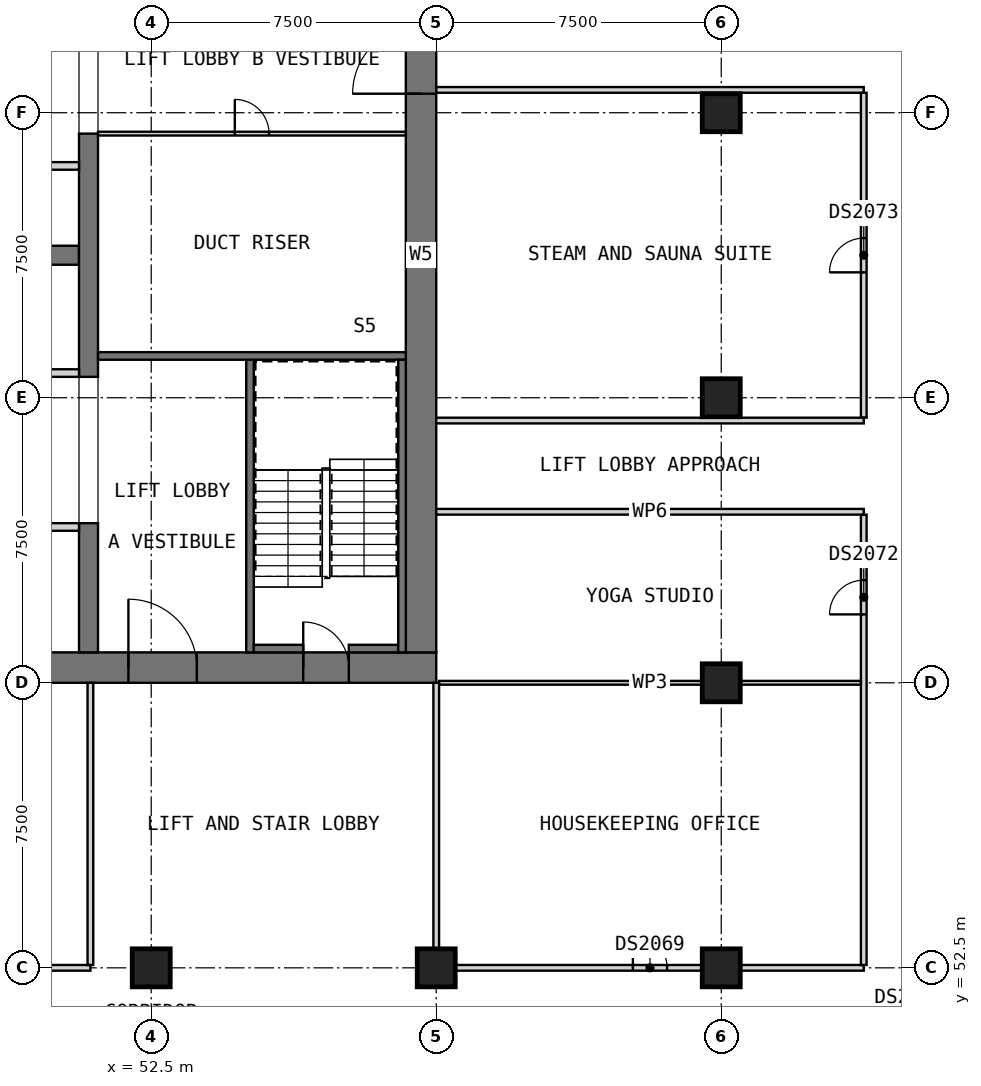
"""IFC4 building model, lengths in metres.
Left out: names, types, materials, properties, quantities, classifications, styles, units other than length and angle.
Written with IfcOpenShell. Run it as: python <this file> out.ifc"""

import sys

from ifc_helpers import new_model, si_unit, direction, frame, frame_2d, origin, origin_2d, place, context, subcontext, project, spatial, rectangle, extrude, element, fill, save


model = new_model("IFC4")
c1 = context("Model", 3, precision=1e-05, world=origin(), true_north=direction((0.0, 1.0)))
c2 = subcontext(c1, "Body", "Model", "MODEL_VIEW")
j1 = project(units=[si_unit("LENGTHUNIT", "METRE"), si_unit("PLANEANGLEUNIT", "RADIAN")], contexts=[c1])
p1 = place(None, origin())
s1 = spatial("IfcSite", under=j1, at=p1, CompositionType="ELEMENT")
p2 = place(p1, origin())
s2 = spatial("IfcBuilding", under=s1, at=p2, CompositionType="ELEMENT")
p3 = place(p2, frame((0.0, 0.0, 133.8)))
s3 = spatial("IfcBuildingStorey", under=s2, at=p3, CompositionType="ELEMENT", Elevation=133.8)
for number, where, z_axis, x_axis in (
    (1, (52.5, 52.5, 0.0), (0.0, 0.0, 1.0), (1.0, 0.0, 0.0)),
    (2, (60.0, 52.5, 0.0), (0.0, 0.0, 1.0), (1.0, 0.0, 0.0)),
    (3, (67.5, 52.5, 0.0), (0.0, 0.0, 1.0), (1.0, 0.0, 0.0)),
    (4, (67.5, 60.0, 0.0), (0.0, 0.0, 1.0), (1.0, 0.0, 0.0)),
    (5, (67.5, 67.5, 0.0), (0.0, 0.0, 1.0), (1.0, 0.0, 0.0)),
    (6, (67.5, 75.0, 0.0), (0.0, 0.0, 1.0), (1.0, 0.0, 0.0)),
):
    element("IfcColumn", number, at=place(p3, frame(where, z_axis=z_axis, x_axis=x_axis)), inside=s3, PredefinedType="COLUMN", context=c2, shape_type="SweptSolid", body=[
        extrude(rectangle(XDim=1.0, YDim=1.0, at=origin_2d()), origin(), (0.0, 0.0, 1.0), 3.6),
    ])
p4 = place(p3, frame((30.0, 60.4, 0.0), z_axis=(0.0, 0.0, 1.0), x_axis=(1.0, 0.0, 0.0)))
e7 = element("IfcWall", 7, at=p4, inside=s3, PredefinedType="SHEAR", context=c2, shape_type="SweptSolid", body=[
    extrude(rectangle(XDim=30.0, YDim=0.8, at=frame_2d((15.0, 0.0))), origin(), (0.0, 0.0, 1.0), 3.6),
])
p5 = place(p4, frame((21.9, 0.0, 0.0)))
e8 = element("IfcOpeningElement", 8, at=p5, cuts=e7, PredefinedType="OPENING", context=c2, shape_type="SweptSolid", body=[
    extrude(rectangle(XDim=1.8, YDim=2.1, at=frame_2d((0.9, 1.05))), frame((0.0, 0.41, 0.0), z_axis=(0.0, -1.0, 0.0), x_axis=(1.0, 0.0, 0.0)), (0.0, 0.0, 1.0), 0.82),
])
p6 = place(p4, frame((26.5, 0.0, 0.0)))
e9 = element("IfcOpeningElement", 9, at=p6, cuts=e7, PredefinedType="OPENING", context=c2, shape_type="SweptSolid", body=[
    extrude(rectangle(XDim=1.2, YDim=2.1, at=frame_2d((0.6, 1.05))), frame((0.0, 0.41, 0.0), z_axis=(0.0, -1.0, 0.0), x_axis=(1.0, 0.0, 0.0)), (0.0, 0.0, 1.0), 0.82),
])
p7 = place(p3, frame((59.6, 60.8, 0.0), z_axis=(0.0, 0.0, 1.0), x_axis=(0.0, 1.0, 0.0)))
e10 = element("IfcWall", 10, at=p7, inside=s3, PredefinedType="SHEAR", context=c2, shape_type="SweptSolid", body=[
    extrude(rectangle(XDim=20.9, YDim=0.8, at=frame_2d((10.45, 0.0))), origin(), (0.0, 0.0, 1.0), 3.6),
])
p8 = place(p7, frame((14.7, 0.0, 0.0)))
e11 = element("IfcOpeningElement", 11, at=p8, cuts=e10, PredefinedType="OPENING", context=c2, shape_type="SweptSolid", body=[
    extrude(rectangle(XDim=1.8, YDim=2.1, at=frame_2d((0.9, 1.05))), frame((0.0, 0.41, 0.0), z_axis=(0.0, -1.0, 0.0), x_axis=(1.0, 0.0, 0.0)), (0.0, 0.0, 1.0), 0.82),
])
p9 = place(p3, frame((35.0, 71.25, 0.0), z_axis=(0.0, 0.0, 1.0), x_axis=(1.0, 0.0, 0.0)))
e12 = element("IfcWall", 12, at=p9, inside=s3, PredefinedType="SHEAR", context=c2, shape_type="SweptSolid", body=[
    extrude(rectangle(XDim=15.6, YDim=0.5, at=frame_2d((7.8, 0.0))), origin(), (0.0, 0.0, 1.0), 3.6),
])
p10 = place(p3, frame((50.85, 60.8, 0.0), z_axis=(0.0, 0.0, 1.0), x_axis=(0.0, 1.0, 0.0)))
e13 = element("IfcWall", 13, at=p10, inside=s3, PredefinedType="SHEAR", context=c2, shape_type="SweptSolid", body=[
    extrude(rectangle(XDim=3.4, YDim=0.5, at=frame_2d((1.7, 0.0))), origin(), (0.0, 0.0, 1.0), 3.6),
])
p11 = place(p3, frame((50.85, 68.05, 0.0), z_axis=(0.0, 0.0, 1.0), x_axis=(0.0, 1.0, 0.0)))
e14 = element("IfcWall", 14, at=p11, inside=s3, PredefinedType="SHEAR", context=c2, shape_type="SweptSolid", body=[
    extrude(rectangle(XDim=6.4, YDim=0.5, at=frame_2d((3.2, 0.0))), origin(), (0.0, 0.0, 1.0), 3.6),
])
p12 = place(p3, frame((35.0, 64.1, 0.0), z_axis=(0.0, 0.0, 1.0), x_axis=(1.0, 0.0, 0.0)))
e15 = element("IfcWall", 15, at=p12, inside=s3, PredefinedType="PARTITIONING", context=c2, shape_type="SweptSolid", body=[
    extrude(rectangle(XDim=15.6, YDim=0.2, at=frame_2d((7.8, 0.0))), origin(), (0.0, 0.0, 1.0), 3.35),
])
p13 = place(p12, frame((3.525, 0.0, 0.0)))
e16 = element("IfcOpeningElement", 16, at=p13, cuts=e15, PredefinedType="OPENING", context=c2, shape_type="SweptSolid", body=[
    extrude(rectangle(XDim=0.9, YDim=2.1, at=frame_2d((0.45, 1.05))), frame((0.0, 0.11, 0.0), z_axis=(0.0, -1.0, 0.0), x_axis=(1.0, 0.0, 0.0)), (0.0, 0.0, 1.0), 0.22),
])
p14 = place(p12, frame((11.325, 0.0, 0.0)))
e17 = element("IfcOpeningElement", 17, at=p14, cuts=e15, PredefinedType="OPENING", context=c2, shape_type="SweptSolid", body=[
    extrude(rectangle(XDim=0.9, YDim=2.1, at=frame_2d((0.45, 1.05))), frame((0.0, 0.11, 0.0), z_axis=(0.0, -1.0, 0.0), x_axis=(1.0, 0.0, 0.0)), (0.0, 0.0, 1.0), 0.22),
])
p15 = place(p3, frame((35.0, 68.15, 0.0), z_axis=(0.0, 0.0, 1.0), x_axis=(1.0, 0.0, 0.0)))
e18 = element("IfcWall", 18, at=p15, inside=s3, PredefinedType="PARTITIONING", context=c2, shape_type="SweptSolid", body=[
    extrude(rectangle(XDim=15.6, YDim=0.2, at=frame_2d((7.8, 0.0))), origin(), (0.0, 0.0, 1.0), 3.35),
])
p16 = place(p15, frame((2.6, 0.0, 0.0)))
e19 = element("IfcOpeningElement", 19, at=p16, cuts=e18, PredefinedType="OPENING", context=c2, shape_type="SweptSolid", body=[
    extrude(rectangle(XDim=0.9, YDim=2.1, at=frame_2d((0.45, 1.05))), frame((0.0, 0.11, 0.0), z_axis=(0.0, -1.0, 0.0), x_axis=(1.0, 0.0, 0.0)), (0.0, 0.0, 1.0), 0.22),
])
p17 = place(p15, frame((10.4, 0.0, 0.0)))
e20 = element("IfcOpeningElement", 20, at=p17, cuts=e18, PredefinedType="OPENING", context=c2, shape_type="SweptSolid", body=[
    extrude(rectangle(XDim=0.9, YDim=2.1, at=frame_2d((0.45, 1.05))), frame((0.0, 0.11, 0.0), z_axis=(0.0, -1.0, 0.0), x_axis=(1.0, 0.0, 0.0)), (0.0, 0.0, 1.0), 0.22),
])
p18 = place(p3, frame((35.0, 73.6, 0.0), z_axis=(0.0, 0.0, 1.0), x_axis=(1.0, 0.0, 0.0)))
e21 = element("IfcWall", 21, at=p18, inside=s3, PredefinedType="SOLIDWALL", context=c2, shape_type="SweptSolid", body=[
    extrude(rectangle(XDim=15.6, YDim=0.2, at=frame_2d((7.8, 0.0))), origin(), (0.0, 0.0, 1.0), 3.6),
])
p19 = place(p18, frame((0.75, 0.0, 0.0)))
e22 = element("IfcOpeningElement", 22, at=p19, cuts=e21, PredefinedType="OPENING", context=c2, shape_type="SweptSolid", body=[
    extrude(rectangle(XDim=1.1, YDim=2.1, at=frame_2d((0.55, 1.05))), frame((0.0, 0.11, 0.0), z_axis=(0.0, -1.0, 0.0), x_axis=(1.0, 0.0, 0.0)), (0.0, 0.0, 1.0), 0.22),
])
p20 = place(p18, frame((3.35, 0.0, 0.0)))
e23 = element("IfcOpeningElement", 23, at=p20, cuts=e21, PredefinedType="OPENING", context=c2, shape_type="SweptSolid", body=[
    extrude(rectangle(XDim=1.1, YDim=2.1, at=frame_2d((0.55, 1.05))), frame((0.0, 0.11, 0.0), z_axis=(0.0, -1.0, 0.0), x_axis=(1.0, 0.0, 0.0)), (0.0, 0.0, 1.0), 0.22),
])
p21 = place(p18, frame((5.95, 0.0, 0.0)))
e24 = element("IfcOpeningElement", 24, at=p21, cuts=e21, PredefinedType="OPENING", context=c2, shape_type="SweptSolid", body=[
    extrude(rectangle(XDim=1.1, YDim=2.1, at=frame_2d((0.55, 1.05))), frame((0.0, 0.11, 0.0), z_axis=(0.0, -1.0, 0.0), x_axis=(1.0, 0.0, 0.0)), (0.0, 0.0, 1.0), 0.22),
])
p22 = place(p18, frame((8.55, 0.0, 0.0)))
e25 = element("IfcOpeningElement", 25, at=p22, cuts=e21, PredefinedType="OPENING", context=c2, shape_type="SweptSolid", body=[
    extrude(rectangle(XDim=1.1, YDim=2.1, at=frame_2d((0.55, 1.05))), frame((0.0, 0.11, 0.0), z_axis=(0.0, -1.0, 0.0), x_axis=(1.0, 0.0, 0.0)), (0.0, 0.0, 1.0), 0.22),
])
p23 = place(p18, frame((11.15, 0.0, 0.0)))
e26 = element("IfcOpeningElement", 26, at=p23, cuts=e21, PredefinedType="OPENING", context=c2, shape_type="SweptSolid", body=[
    extrude(rectangle(XDim=1.1, YDim=2.1, at=frame_2d((0.55, 1.05))), frame((0.0, 0.11, 0.0), z_axis=(0.0, -1.0, 0.0), x_axis=(1.0, 0.0, 0.0)), (0.0, 0.0, 1.0), 0.22),
])
p24 = place(p18, frame((13.75, 0.0, 0.0)))
e27 = element("IfcOpeningElement", 27, at=p24, cuts=e21, PredefinedType="OPENING", context=c2, shape_type="SweptSolid", body=[
    extrude(rectangle(XDim=1.1, YDim=2.1, at=frame_2d((0.55, 1.05))), frame((0.0, 0.11, 0.0), z_axis=(0.0, -1.0, 0.0), x_axis=(1.0, 0.0, 0.0)), (0.0, 0.0, 1.0), 0.22),
])
p25 = place(p3, frame((55.1, 60.8, 0.0), z_axis=(0.0, 0.0, 1.0), x_axis=(0.0, 1.0, 0.0)))
e28 = element("IfcWall", 28, at=p25, inside=s3, PredefinedType="SOLIDWALL", context=c2, shape_type="SweptSolid", body=[
    extrude(rectangle(XDim=7.8, YDim=0.2, at=frame_2d((3.9, 0.0))), origin(), (0.0, 0.0, 1.0), 3.35),
])
p26 = place(p3, frame((51.1, 68.6, 0.0), z_axis=(0.0, 0.0, 1.0), x_axis=(1.0, 0.0, 0.0)))
e29 = element("IfcWall", 29, at=p26, inside=s3, PredefinedType="SOLIDWALL", context=c2, shape_type="SweptSolid", body=[
    extrude(rectangle(XDim=8.1, YDim=0.2, at=frame_2d((4.05, 0.0))), origin(), (0.0, 0.0, 1.0), 3.35),
])
for number, where, z_axis, x_axis in (
    (30, (55.2, 60.9, 0.0), (0.0, 0.0, 1.0), (1.0, 0.0, 0.0)),
    (31, (57.7, 60.9, 0.0), (0.0, 0.0, 1.0), (1.0, 0.0, 0.0)),
):
    element("IfcWall", number, at=place(p3, frame(where, z_axis=z_axis, x_axis=x_axis)), inside=s3, PredefinedType="SOLIDWALL", context=c2, shape_type="SweptSolid", body=[
        extrude(rectangle(XDim=1.3, YDim=0.2, at=frame_2d((0.65, 0.0))), origin(), (0.0, 0.0, 1.0), 3.35),
    ])
p27 = place(p3, frame((59.1, 60.8, 0.0), z_axis=(0.0, 0.0, 1.0), x_axis=(0.0, 1.0, 0.0)))
e32 = element("IfcWall", 32, at=p27, inside=s3, PredefinedType="SOLIDWALL", context=c2, shape_type="SweptSolid", body=[
    extrude(rectangle(XDim=7.7, YDim=0.2, at=frame_2d((3.85, 0.0))), origin(), (0.0, 0.0, 1.0), 3.35),
])
p28 = place(p3, frame((51.1, 74.45, 0.0), z_axis=(0.0, 0.0, 1.0), x_axis=(1.0, 0.0, 0.0)))
e33 = element("IfcWall", 33, at=p28, inside=s3, PredefinedType="PARTITIONING", context=c2, shape_type="SweptSolid", body=[
    extrude(rectangle(XDim=8.1, YDim=0.1, at=frame_2d((4.05, 0.0))), origin(), (0.0, 0.0, 1.0), 3.35),
])
p29 = place(p28, frame((3.6, 0.0, 0.0)))
e34 = element("IfcOpeningElement", 34, at=p29, cuts=e33, PredefinedType="OPENING", context=c2, shape_type="SweptSolid", body=[
    extrude(rectangle(XDim=0.9, YDim=2.1, at=frame_2d((0.45, 1.05))), frame((0.0, 0.06, 0.0), z_axis=(0.0, -1.0, 0.0), x_axis=(1.0, 0.0, 0.0)), (0.0, 0.0, 1.0), 0.12),
])
p30 = place(p3, frame((33.75, 52.5, 0.0), z_axis=(0.0, 0.0, 1.0), x_axis=(1.0, 0.0, 0.0)))
e35 = element("IfcWall", 35, at=p30, inside=s3, PredefinedType="PARTITIONING", context=c2, shape_type="SweptSolid", body=[
    extrude(rectangle(XDim=17.15, YDim=0.15, at=frame_2d((8.575, 0.0))), origin(), (0.0, 0.0, 1.0), 3.35),
])
p31 = place(p30, frame((1.8, 0.0, 0.0)))
e36 = element("IfcOpeningElement", 36, at=p31, cuts=e35, PredefinedType="OPENING", context=c2, shape_type="SweptSolid", body=[
    extrude(rectangle(XDim=0.9, YDim=2.1, at=frame_2d((0.45, 1.05))), frame((0.0, 0.085, 0.0), z_axis=(0.0, -1.0, 0.0), x_axis=(1.0, 0.0, 0.0)), (0.0, 0.0, 1.0), 0.17),
])
p32 = place(p30, frame((5.775, 0.0, 0.0)))
e37 = element("IfcOpeningElement", 37, at=p32, cuts=e35, PredefinedType="OPENING", context=c2, shape_type="SweptSolid", body=[
    extrude(rectangle(XDim=0.9, YDim=2.1, at=frame_2d((0.45, 1.05))), frame((0.0, 0.085, 0.0), z_axis=(0.0, -1.0, 0.0), x_axis=(1.0, 0.0, 0.0)), (0.0, 0.0, 1.0), 0.17),
])
p33 = place(p30, frame((12.1, 0.0, 0.0)))
e38 = element("IfcOpeningElement", 38, at=p33, cuts=e35, PredefinedType="OPENING", context=c2, shape_type="SweptSolid", body=[
    extrude(rectangle(XDim=0.9, YDim=2.1, at=frame_2d((0.45, 1.05))), frame((0.0, 0.085, 0.0), z_axis=(0.0, -1.0, 0.0), x_axis=(1.0, 0.0, 0.0)), (0.0, 0.0, 1.0), 0.17),
])
p34 = place(p3, frame((60.0, 52.5, 0.0), z_axis=(0.0, 0.0, 1.0), x_axis=(1.0, 0.0, 0.0)))
e39 = element("IfcWall", 39, at=p34, inside=s3, PredefinedType="PARTITIONING", context=c2, shape_type="SweptSolid", body=[
    extrude(rectangle(XDim=11.25, YDim=0.15, at=frame_2d((5.625, 0.0))), origin(), (0.0, 0.0, 1.0), 3.35),
])
p35 = place(p34, frame((5.175, 0.0, 0.0)))
e40 = element("IfcOpeningElement", 40, at=p35, cuts=e39, PredefinedType="OPENING", context=c2, shape_type="SweptSolid", body=[
    extrude(rectangle(XDim=0.9, YDim=2.1, at=frame_2d((0.45, 1.05))), frame((0.0, 0.085, 0.0), z_axis=(0.0, -1.0, 0.0), x_axis=(1.0, 0.0, 0.0)), (0.0, 0.0, 1.0), 0.17),
])
p36 = place(p3, frame((71.25, 52.575, 0.0), z_axis=(0.0, 0.0, 1.0), x_axis=(0.0, 1.0, 0.0)))
e41 = element("IfcWall", 41, at=p36, inside=s3, PredefinedType="PARTITIONING", context=c2, shape_type="SweptSolid", body=[
    extrude(rectangle(XDim=11.85, YDim=0.15, at=frame_2d((5.925, 0.0))), origin(), (0.0, 0.0, 1.0), 3.35),
])
p37 = place(p36, frame((9.225, 0.0, 0.0)))
e42 = element("IfcOpeningElement", 42, at=p37, cuts=e41, PredefinedType="OPENING", context=c2, shape_type="SweptSolid", body=[
    extrude(rectangle(XDim=0.9, YDim=2.1, at=frame_2d((0.45, 1.05))), frame((0.0, 0.085, 0.0), z_axis=(0.0, -1.0, 0.0), x_axis=(1.0, 0.0, 0.0)), (0.0, 0.0, 1.0), 0.17),
])
p38 = place(p3, frame((71.25, 66.975, 0.0), z_axis=(0.0, 0.0, 1.0), x_axis=(0.0, 1.0, 0.0)))
e43 = element("IfcWall", 43, at=p38, inside=s3, PredefinedType="PARTITIONING", context=c2, shape_type="SweptSolid", body=[
    extrude(rectangle(XDim=8.55, YDim=0.15, at=frame_2d((4.275, 0.0))), origin(), (0.0, 0.0, 1.0), 3.35),
])
p39 = place(p38, frame((3.825, 0.0, 0.0)))
e44 = element("IfcOpeningElement", 44, at=p39, cuts=e43, PredefinedType="OPENING", context=c2, shape_type="SweptSolid", body=[
    extrude(rectangle(XDim=0.9, YDim=2.1, at=frame_2d((0.45, 1.05))), frame((0.0, 0.085, 0.0), z_axis=(0.0, -1.0, 0.0), x_axis=(1.0, 0.0, 0.0)), (0.0, 0.0, 1.0), 0.17),
])
p40 = place(p3, frame((60.075, 60.0, 0.0), z_axis=(0.0, 0.0, 1.0), x_axis=(1.0, 0.0, 0.0)))
e45 = element("IfcWall", 45, at=p40, inside=s3, PredefinedType="PARTITIONING", context=c2, shape_type="SweptSolid", body=[
    extrude(rectangle(XDim=11.1, YDim=0.1, at=frame_2d((5.55, 0.0))), origin(), (0.0, 0.0, 1.0), 3.35),
])
for number, where, z_axis, x_axis in (
    (46, (60.0, 64.5, 0.0), (0.0, 0.0, 1.0), (1.0, 0.0, 0.0)),
    (47, (60.0, 66.9, 0.0), (0.0, 0.0, 1.0), (1.0, 0.0, 0.0)),
    (48, (60.0, 75.6, 0.0), (0.0, 0.0, 1.0), (1.0, 0.0, 0.0)),
):
    element("IfcWall", number, at=place(p3, frame(where, z_axis=z_axis, x_axis=x_axis)), inside=s3, PredefinedType="PARTITIONING", context=c2, shape_type="SweptSolid", body=[
        extrude(rectangle(XDim=11.25, YDim=0.15, at=frame_2d((5.625, 0.0))), origin(), (0.0, 0.0, 1.0), 3.35),
    ])
for number, where, z_axis, x_axis in (
    (49, (50.9, 52.575, 0.0), (0.0, 0.0, 1.0), (0.0, 1.0, 0.0)),
    (50, (60.0, 52.575, 0.0), (0.0, 0.0, 1.0), (0.0, 1.0, 0.0)),
):
    element("IfcWall", number, at=place(p3, frame(where, z_axis=z_axis, x_axis=x_axis)), inside=s3, PredefinedType="PARTITIONING", context=c2, shape_type="SweptSolid", body=[
        extrude(rectangle(XDim=7.425, YDim=0.15, at=frame_2d((3.712, 0.0))), origin(), (0.0, 0.0, 1.0), 3.35),
    ])
p41 = place(p5, origin())
e51 = element("IfcDoor", 51, at=p41, inside=s3, OperationType="DOUBLE_DOOR_SINGLE_SWING", PredefinedType="DOOR", context=c2, shape_type="SweptSolid", body=[
    extrude(rectangle(XDim=1.8, YDim=2.1, at=frame_2d((0.9, 1.05))), frame((0.0, 0.025, 0.0), z_axis=(0.0, -1.0, 0.0), x_axis=(1.0, 0.0, 0.0)), (0.0, 0.0, 1.0), 0.05),
])
fill(e8, e51)
p42 = place(p8, origin())
e52 = element("IfcDoor", 52, at=p42, inside=s3, OperationType="DOUBLE_DOOR_SINGLE_SWING", PredefinedType="DOOR", context=c2, shape_type="SweptSolid", body=[
    extrude(rectangle(XDim=1.8, YDim=2.1, at=frame_2d((0.9, 1.05))), frame((0.0, 0.025, 0.0), z_axis=(0.0, -1.0, 0.0), x_axis=(1.0, 0.0, 0.0)), (0.0, 0.0, 1.0), 0.05),
])
fill(e11, e52)
p43 = place(p6, origin())
e53 = element("IfcDoor", 53, at=p43, inside=s3, OperationType="SINGLE_SWING_LEFT", PredefinedType="DOOR", context=c2, shape_type="SweptSolid", body=[
    extrude(rectangle(XDim=1.2, YDim=2.1, at=frame_2d((0.6, 1.05))), frame((0.0, 0.025, 0.0), z_axis=(0.0, -1.0, 0.0), x_axis=(1.0, 0.0, 0.0)), (0.0, 0.0, 1.0), 0.05),
])
fill(e9, e53)
p44 = place(p29, origin())
e54 = element("IfcDoor", 54, at=p44, inside=s3, OperationType="SINGLE_SWING_RIGHT", PredefinedType="DOOR", context=c2, shape_type="SweptSolid", body=[
    extrude(rectangle(XDim=0.9, YDim=2.1, at=frame_2d((0.45, 1.05))), frame((0.0, 0.025, 0.0), z_axis=(0.0, -1.0, 0.0), x_axis=(1.0, 0.0, 0.0)), (0.0, 0.0, 1.0), 0.05),
])
fill(e34, e54)
p45 = place(p35, origin())
e55 = element("IfcDoor", 55, at=p45, inside=s3, OperationType="SINGLE_SWING_LEFT", PredefinedType="DOOR", context=c2, shape_type="SweptSolid", body=[
    extrude(rectangle(XDim=0.9, YDim=2.1, at=frame_2d((0.45, 1.05))), frame((0.0, 0.025, 0.0), z_axis=(0.0, -1.0, 0.0), x_axis=(1.0, 0.0, 0.0)), (0.0, 0.0, 1.0), 0.05),
])
fill(e40, e55)
p46 = place(p37, origin())
e56 = element("IfcDoor", 56, at=p46, inside=s3, OperationType="SINGLE_SWING_LEFT", PredefinedType="DOOR", context=c2, shape_type="SweptSolid", body=[
    extrude(rectangle(XDim=0.9, YDim=2.1, at=frame_2d((0.45, 1.05))), frame((0.0, 0.025, 0.0), z_axis=(0.0, -1.0, 0.0), x_axis=(1.0, 0.0, 0.0)), (0.0, 0.0, 1.0), 0.05),
])
fill(e42, e56)
p47 = place(p39, origin())
e57 = element("IfcDoor", 57, at=p47, inside=s3, OperationType="SINGLE_SWING_LEFT", PredefinedType="DOOR", context=c2, shape_type="SweptSolid", body=[
    extrude(rectangle(XDim=0.9, YDim=2.1, at=frame_2d((0.45, 1.05))), frame((0.0, 0.025, 0.0), z_axis=(0.0, -1.0, 0.0), x_axis=(1.0, 0.0, 0.0)), (0.0, 0.0, 1.0), 0.05),
])
fill(e44, e57)
save(model, sys.argv[1])
